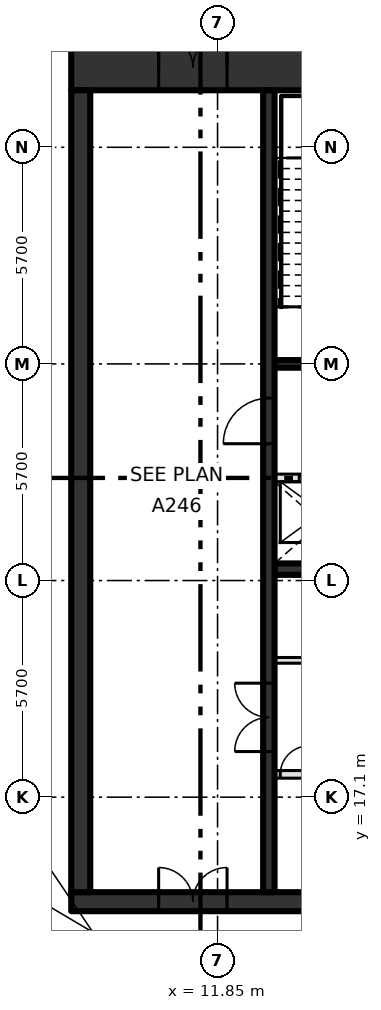
"""IFC4 building model, lengths in metres.
Left out: names, types, materials, properties, quantities, classifications, styles, units other than length and angle.
Written with IfcOpenShell. Run it as: python <this file> out.ifc"""

import sys

from ifc_helpers import new_model, si_unit, direction, frame, frame_2d, origin, place, context, subcontext, project, spatial, rectangle, extrude, element, fill, save


model = new_model("IFC4")
c1 = context("Model", 3, precision=1e-05, world=origin(), true_north=direction((0.0, 1.0)))
c2 = subcontext(c1, "Body", "Model", "MODEL_VIEW")
j1 = project(units=[si_unit("LENGTHUNIT", "METRE"), si_unit("PLANEANGLEUNIT", "RADIAN")], contexts=[c1])
p1 = place(None, origin())
s1 = spatial("IfcSite", under=j1, at=p1, CompositionType="ELEMENT")
p2 = place(p1, origin())
s2 = spatial("IfcBuilding", under=s1, at=p2, CompositionType="ELEMENT")
p3 = place(p2, frame((0.0, 0.0, 348.6)))
s3 = spatial("IfcBuildingStorey", under=s2, at=p3, CompositionType="ELEMENT", Elevation=348.6)
p4 = place(p3, frame((8.0, 14.35, -0.45), z_axis=(0.0, 0.0, 1.0), x_axis=(1.0, 0.0, 0.0)))
e1 = element("IfcWall", 1, at=p4, inside=s3, PredefinedType="SHEAR", context=c2, shape_type="SweptSolid", body=[
    extrude(rectangle(XDim=22.8, YDim=0.5, at=frame_2d((11.4, 0.0))), origin(), (0.0, 0.0, 1.0), 5.55),
])
p5 = place(p4, frame((2.3, 0.0, 0.45)))
e2 = element("IfcOpeningElement", 2, at=p5, cuts=e1, PredefinedType="OPENING", context=c2, shape_type="SweptSolid", body=[
    extrude(rectangle(XDim=1.8, YDim=2.1, at=frame_2d((0.9, 1.05))), frame((0.0, 0.26, 0.0), z_axis=(0.0, -1.0, 0.0), x_axis=(1.0, 0.0, 0.0)), (0.0, 0.0, 1.0), 0.52),
])
p6 = place(p3, frame((8.0, 36.3, -0.45), z_axis=(0.0, 0.0, 1.0), x_axis=(1.0, 0.0, 0.0)))
e3 = element("IfcWall", 3, at=p6, inside=s3, PredefinedType="SHEAR", context=c2, shape_type="SweptSolid", body=[
    extrude(rectangle(XDim=22.8, YDim=1.2, at=frame_2d((11.4, 0.0))), origin(), (0.0, 0.0, 1.0), 5.55),
])
p7 = place(p6, frame((2.3, 0.0, 0.45)))
e4 = element("IfcOpeningElement", 4, at=p7, cuts=e3, PredefinedType="OPENING", context=c2, shape_type="SweptSolid", body=[
    extrude(rectangle(XDim=1.8, YDim=2.1, at=frame_2d((0.9, 1.05))), frame((0.0, 0.61, 0.0), z_axis=(0.0, -1.0, 0.0), x_axis=(1.0, 0.0, 0.0)), (0.0, 0.0, 1.0), 1.22),
])
p8 = place(p3, frame((8.25, 14.6, -0.45), z_axis=(0.0, 0.0, 1.0), x_axis=(0.0, 1.0, 0.0)))
e5 = element("IfcWall", 5, at=p8, inside=s3, PredefinedType="SHEAR", context=c2, shape_type="SweptSolid", body=[
    extrude(rectangle(XDim=21.1, YDim=0.5, at=frame_2d((10.55, 0.0))), origin(), (0.0, 0.0, 1.0), 5.55),
])
p9 = place(p3, frame((13.35, 17.7, 0.0), z_axis=(0.0, 0.0, 1.0), x_axis=(1.0, 0.0, 0.0)))
e6 = element("IfcWall", 6, at=p9, inside=s3, PredefinedType="SOLIDWALL", context=c2, shape_type="SweptSolid", body=[
    extrude(rectangle(XDim=13.425, YDim=0.2, at=frame_2d((6.712, 0.0))), origin(), (0.0, 0.0, 1.0), 5.1),
])
p10 = place(p9, frame((2.0, 0.0, 0.0)))
e7 = element("IfcOpeningElement", 7, at=p10, cuts=e6, PredefinedType="OPENING", context=c2, shape_type="SweptSolid", body=[
    extrude(rectangle(XDim=1.1, YDim=2.1, at=frame_2d((0.55, 1.05))), frame((0.0, 0.11, 0.0), z_axis=(0.0, -1.0, 0.0), x_axis=(1.0, 0.0, 0.0)), (0.0, 0.0, 1.0), 0.22),
])
p11 = place(p9, frame((4.7, 0.0, 0.0)))
e8 = element("IfcOpeningElement", 8, at=p11, cuts=e6, PredefinedType="OPENING", context=c2, shape_type="SweptSolid", body=[
    extrude(rectangle(XDim=1.1, YDim=2.1, at=frame_2d((0.55, 1.05))), frame((0.0, 0.11, 0.0), z_axis=(0.0, -1.0, 0.0), x_axis=(1.0, 0.0, 0.0)), (0.0, 0.0, 1.0), 0.22),
])
p12 = place(p9, frame((7.4, 0.0, 0.0)))
e9 = element("IfcOpeningElement", 9, at=p12, cuts=e6, PredefinedType="OPENING", context=c2, shape_type="SweptSolid", body=[
    extrude(rectangle(XDim=1.1, YDim=2.1, at=frame_2d((0.55, 1.05))), frame((0.0, 0.11, 0.0), z_axis=(0.0, -1.0, 0.0), x_axis=(1.0, 0.0, 0.0)), (0.0, 0.0, 1.0), 0.22),
])
p13 = place(p9, frame((10.1, 0.0, 0.0)))
e10 = element("IfcOpeningElement", 10, at=p13, cuts=e6, PredefinedType="OPENING", context=c2, shape_type="SweptSolid", body=[
    extrude(rectangle(XDim=1.1, YDim=2.1, at=frame_2d((0.55, 1.05))), frame((0.0, 0.11, 0.0), z_axis=(0.0, -1.0, 0.0), x_axis=(1.0, 0.0, 0.0)), (0.0, 0.0, 1.0), 0.22),
])
p14 = place(p9, frame((0.15, 0.0, 0.0)))
e11 = element("IfcOpeningElement", 11, at=p14, cuts=e6, PredefinedType="OPENING", context=c2, shape_type="SweptSolid", body=[
    extrude(rectangle(XDim=0.75, YDim=2.1, at=frame_2d((0.375, 1.05))), frame((0.0, 0.11, 0.0), z_axis=(0.0, -1.0, 0.0), x_axis=(1.0, 0.0, 0.0)), (0.0, 0.0, 1.0), 0.22),
])
p15 = place(p9, frame((12.3, 0.0, 0.0)))
e12 = element("IfcOpeningElement", 12, at=p15, cuts=e6, PredefinedType="OPENING", context=c2, shape_type="SweptSolid", body=[
    extrude(rectangle(XDim=0.75, YDim=2.1, at=frame_2d((0.375, 1.05))), frame((0.0, 0.11, 0.0), z_axis=(0.0, -1.0, 0.0), x_axis=(1.0, 0.0, 0.0)), (0.0, 0.0, 1.0), 0.22),
])
p16 = place(p3, frame((13.35, 20.7, 0.0), z_axis=(0.0, 0.0, 1.0), x_axis=(1.0, 0.0, 0.0)))
e13 = element("IfcWall", 13, at=p16, inside=s3, PredefinedType="PARTITIONING", context=c2, shape_type="SweptSolid", body=[
    extrude(rectangle(XDim=13.425, YDim=0.15, at=frame_2d((6.712, 0.0))), origin(), (0.0, 0.0, 1.0), 5.1),
])
p17 = place(p16, frame((2.1, 0.0, 0.0)))
e14 = element("IfcOpeningElement", 14, at=p17, cuts=e13, PredefinedType="OPENING", context=c2, shape_type="SweptSolid", body=[
    extrude(rectangle(XDim=0.9, YDim=2.1, at=frame_2d((0.45, 1.05))), frame((0.0, 0.085, 0.0), z_axis=(0.0, -1.0, 0.0), x_axis=(1.0, 0.0, 0.0)), (0.0, 0.0, 1.0), 0.17),
])
p18 = place(p16, frame((8.85, 0.0, 0.0)))
e15 = element("IfcOpeningElement", 15, at=p18, cuts=e13, PredefinedType="OPENING", context=c2, shape_type="SweptSolid", body=[
    extrude(rectangle(XDim=0.9, YDim=2.1, at=frame_2d((0.45, 1.05))), frame((0.0, 0.085, 0.0), z_axis=(0.0, -1.0, 0.0), x_axis=(1.0, 0.0, 0.0)), (0.0, 0.0, 1.0), 0.17),
])
p19 = place(p3, frame((13.35, 23.1, 0.0), z_axis=(0.0, 0.0, 1.0), x_axis=(1.0, 0.0, 0.0)))
e16 = element("IfcWall", 16, at=p19, inside=s3, PredefinedType="SHEAR", context=c2, shape_type="SweptSolid", body=[
    extrude(rectangle(XDim=16.95, YDim=0.3, at=frame_2d((8.475, 0.0))), origin(), (0.0, 0.0, 1.0), 5.1),
])
p20 = place(p3, frame((13.35, 25.5, 0.0), z_axis=(0.0, 0.0, 1.0), x_axis=(1.0, 0.0, 0.0)))
e17 = element("IfcWall", 17, at=p20, inside=s3, PredefinedType="SOLIDWALL", context=c2, shape_type="SweptSolid", body=[
    extrude(rectangle(XDim=16.95, YDim=0.2, at=frame_2d((8.475, 0.0))), origin(), (0.0, 0.0, 1.0), 5.1),
])
p21 = place(p20, frame((0.65, 0.0, 0.0)))
e18 = element("IfcOpeningElement", 18, at=p21, cuts=e17, PredefinedType="OPENING", context=c2, shape_type="SweptSolid", body=[
    extrude(rectangle(XDim=1.1, YDim=2.1, at=frame_2d((0.55, 1.05))), frame((0.0, 0.11, 0.0), z_axis=(0.0, -1.0, 0.0), x_axis=(1.0, 0.0, 0.0)), (0.0, 0.0, 1.0), 0.22),
])
p22 = place(p20, frame((3.35, 0.0, 0.0)))
e19 = element("IfcOpeningElement", 19, at=p22, cuts=e17, PredefinedType="OPENING", context=c2, shape_type="SweptSolid", body=[
    extrude(rectangle(XDim=1.1, YDim=2.1, at=frame_2d((0.55, 1.05))), frame((0.0, 0.11, 0.0), z_axis=(0.0, -1.0, 0.0), x_axis=(1.0, 0.0, 0.0)), (0.0, 0.0, 1.0), 0.22),
])
p23 = place(p20, frame((6.05, 0.0, 0.0)))
e20 = element("IfcOpeningElement", 20, at=p23, cuts=e17, PredefinedType="OPENING", context=c2, shape_type="SweptSolid", body=[
    extrude(rectangle(XDim=1.1, YDim=2.1, at=frame_2d((0.55, 1.05))), frame((0.0, 0.11, 0.0), z_axis=(0.0, -1.0, 0.0), x_axis=(1.0, 0.0, 0.0)), (0.0, 0.0, 1.0), 0.22),
])
p24 = place(p20, frame((8.75, 0.0, 0.0)))
e21 = element("IfcOpeningElement", 21, at=p24, cuts=e17, PredefinedType="OPENING", context=c2, shape_type="SweptSolid", body=[
    extrude(rectangle(XDim=1.1, YDim=2.1, at=frame_2d((0.55, 1.05))), frame((0.0, 0.11, 0.0), z_axis=(0.0, -1.0, 0.0), x_axis=(1.0, 0.0, 0.0)), (0.0, 0.0, 1.0), 0.22),
])
p25 = place(p20, frame((13.0, 0.0, 0.0)))
e22 = element("IfcOpeningElement", 22, at=p25, cuts=e17, PredefinedType="OPENING", context=c2, shape_type="SweptSolid", body=[
    extrude(rectangle(XDim=0.9, YDim=2.1, at=frame_2d((0.45, 1.05))), frame((0.0, 0.11, 0.0), z_axis=(0.0, -1.0, 0.0), x_axis=(1.0, 0.0, 0.0)), (0.0, 0.0, 1.0), 0.22),
])
p26 = place(p3, frame((13.35, 28.5, 0.0), z_axis=(0.0, 0.0, 1.0), x_axis=(1.0, 0.0, 0.0)))
e23 = element("IfcWall", 23, at=p26, inside=s3, PredefinedType="SOLIDWALL", context=c2, shape_type="SweptSolid", body=[
    extrude(rectangle(XDim=6.75, YDim=0.2, at=frame_2d((3.375, 0.0))), origin(), (0.0, 0.0, 1.0), 5.1),
])
p27 = place(p26, frame((0.95, 0.0, 0.0)))
e24 = element("IfcOpeningElement", 24, at=p27, cuts=e23, PredefinedType="OPENING", context=c2, shape_type="SweptSolid", body=[
    extrude(rectangle(XDim=1.2, YDim=2.1, at=frame_2d((0.6, 1.05))), frame((0.0, 0.11, 0.0), z_axis=(0.0, -1.0, 0.0), x_axis=(1.0, 0.0, 0.0)), (0.0, 0.0, 1.0), 0.22),
])
p28 = place(p26, frame((3.75, 0.0, 0.0)))
e25 = element("IfcOpeningElement", 25, at=p28, cuts=e23, PredefinedType="OPENING", context=c2, shape_type="SweptSolid", body=[
    extrude(rectangle(XDim=1.1, YDim=2.1, at=frame_2d((0.55, 1.05))), frame((0.0, 0.11, 0.0), z_axis=(0.0, -1.0, 0.0), x_axis=(1.0, 0.0, 0.0)), (0.0, 0.0, 1.0), 0.22),
])
p29 = place(p3, frame((13.2, 14.6, 0.0), z_axis=(0.0, 0.0, 1.0), x_axis=(0.0, 1.0, 0.0)))
e26 = element("IfcWall", 26, at=p29, inside=s3, PredefinedType="SHEAR", context=c2, shape_type="SweptSolid", body=[
    extrude(rectangle(XDim=21.1, YDim=0.3, at=frame_2d((10.55, 0.0))), origin(), (0.0, 0.0, 1.0), 5.1),
])
p30 = place(p29, frame((3.7, 0.0, 0.0)))
e27 = element("IfcOpeningElement", 27, at=p30, cuts=e26, PredefinedType="OPENING", context=c2, shape_type="SweptSolid", body=[
    extrude(rectangle(XDim=1.8, YDim=2.1, at=frame_2d((0.9, 1.05))), frame((0.0, 0.16, 0.0), z_axis=(0.0, -1.0, 0.0), x_axis=(1.0, 0.0, 0.0)), (0.0, 0.0, 1.0), 0.32),
])
p31 = place(p29, frame((11.8, 0.0, 0.0)))
e28 = element("IfcOpeningElement", 28, at=p31, cuts=e26, PredefinedType="OPENING", context=c2, shape_type="SweptSolid", body=[
    extrude(rectangle(XDim=1.2, YDim=2.1, at=frame_2d((0.6, 1.05))), frame((0.0, 0.16, 0.0), z_axis=(0.0, -1.0, 0.0), x_axis=(1.0, 0.0, 0.0)), (0.0, 0.0, 1.0), 0.32),
])
p32 = place(p21, origin())
e29 = element("IfcDoor", 29, at=p32, inside=s3, OperationType="SLIDING_TO_LEFT", PredefinedType="DOOR", context=c2, shape_type="SweptSolid", body=[
    extrude(rectangle(XDim=1.1, YDim=2.1, at=frame_2d((0.55, 1.05))), frame((0.0, 0.025, 0.0), z_axis=(0.0, -1.0, 0.0), x_axis=(1.0, 0.0, 0.0)), (0.0, 0.0, 1.0), 0.05),
])
fill(e18, e29)
p33 = place(p14, origin())
e30 = element("IfcDoor", 30, at=p33, inside=s3, OperationType="SINGLE_SWING_RIGHT", PredefinedType="DOOR", context=c2, shape_type="SweptSolid", body=[
    extrude(rectangle(XDim=0.75, YDim=2.1, at=frame_2d((0.375, 1.05))), frame((0.0, 0.025, 0.0), z_axis=(0.0, -1.0, 0.0), x_axis=(1.0, 0.0, 0.0)), (0.0, 0.0, 1.0), 0.05),
])
fill(e11, e30)
p34 = place(p30, origin())
e31 = element("IfcDoor", 31, at=p34, inside=s3, OperationType="DOUBLE_DOOR_SINGLE_SWING", PredefinedType="DOOR", context=c2, shape_type="SweptSolid", body=[
    extrude(rectangle(XDim=1.8, YDim=2.1, at=frame_2d((0.9, 1.05))), frame((0.0, 0.025, 0.0), z_axis=(0.0, -1.0, 0.0), x_axis=(1.0, 0.0, 0.0)), (0.0, 0.0, 1.0), 0.05),
])
fill(e27, e31)
p35 = place(p31, origin())
e32 = element("IfcDoor", 32, at=p35, inside=s3, OperationType="SINGLE_SWING_LEFT", PredefinedType="DOOR", context=c2, shape_type="SweptSolid", body=[
    extrude(rectangle(XDim=1.2, YDim=2.1, at=frame_2d((0.6, 1.05))), frame((0.0, 0.025, 0.0), z_axis=(0.0, -1.0, 0.0), x_axis=(1.0, 0.0, 0.0)), (0.0, 0.0, 1.0), 0.05),
])
fill(e28, e32)
p36 = place(p7, origin())
e33 = element("IfcDoor", 33, at=p36, inside=s3, OperationType="DOUBLE_DOOR_SINGLE_SWING", PredefinedType="DOOR", context=c2, shape_type="SweptSolid", body=[
    extrude(rectangle(XDim=1.8, YDim=2.1, at=frame_2d((0.9, 1.05))), frame((0.0, 0.025, 0.0), z_axis=(0.0, -1.0, 0.0), x_axis=(1.0, 0.0, 0.0)), (0.0, 0.0, 1.0), 0.05),
])
fill(e4, e33)
p37 = place(p5, origin())
e34 = element("IfcDoor", 34, at=p37, inside=s3, OperationType="DOUBLE_DOOR_SINGLE_SWING", PredefinedType="DOOR", context=c2, shape_type="SweptSolid", body=[
    extrude(rectangle(XDim=1.8, YDim=2.1, at=frame_2d((0.9, 1.05))), frame((0.0, 0.025, 0.0), z_axis=(0.0, -1.0, 0.0), x_axis=(1.0, 0.0, 0.0)), (0.0, 0.0, 1.0), 0.05),
])
fill(e2, e34)
save(model, sys.argv[1])
